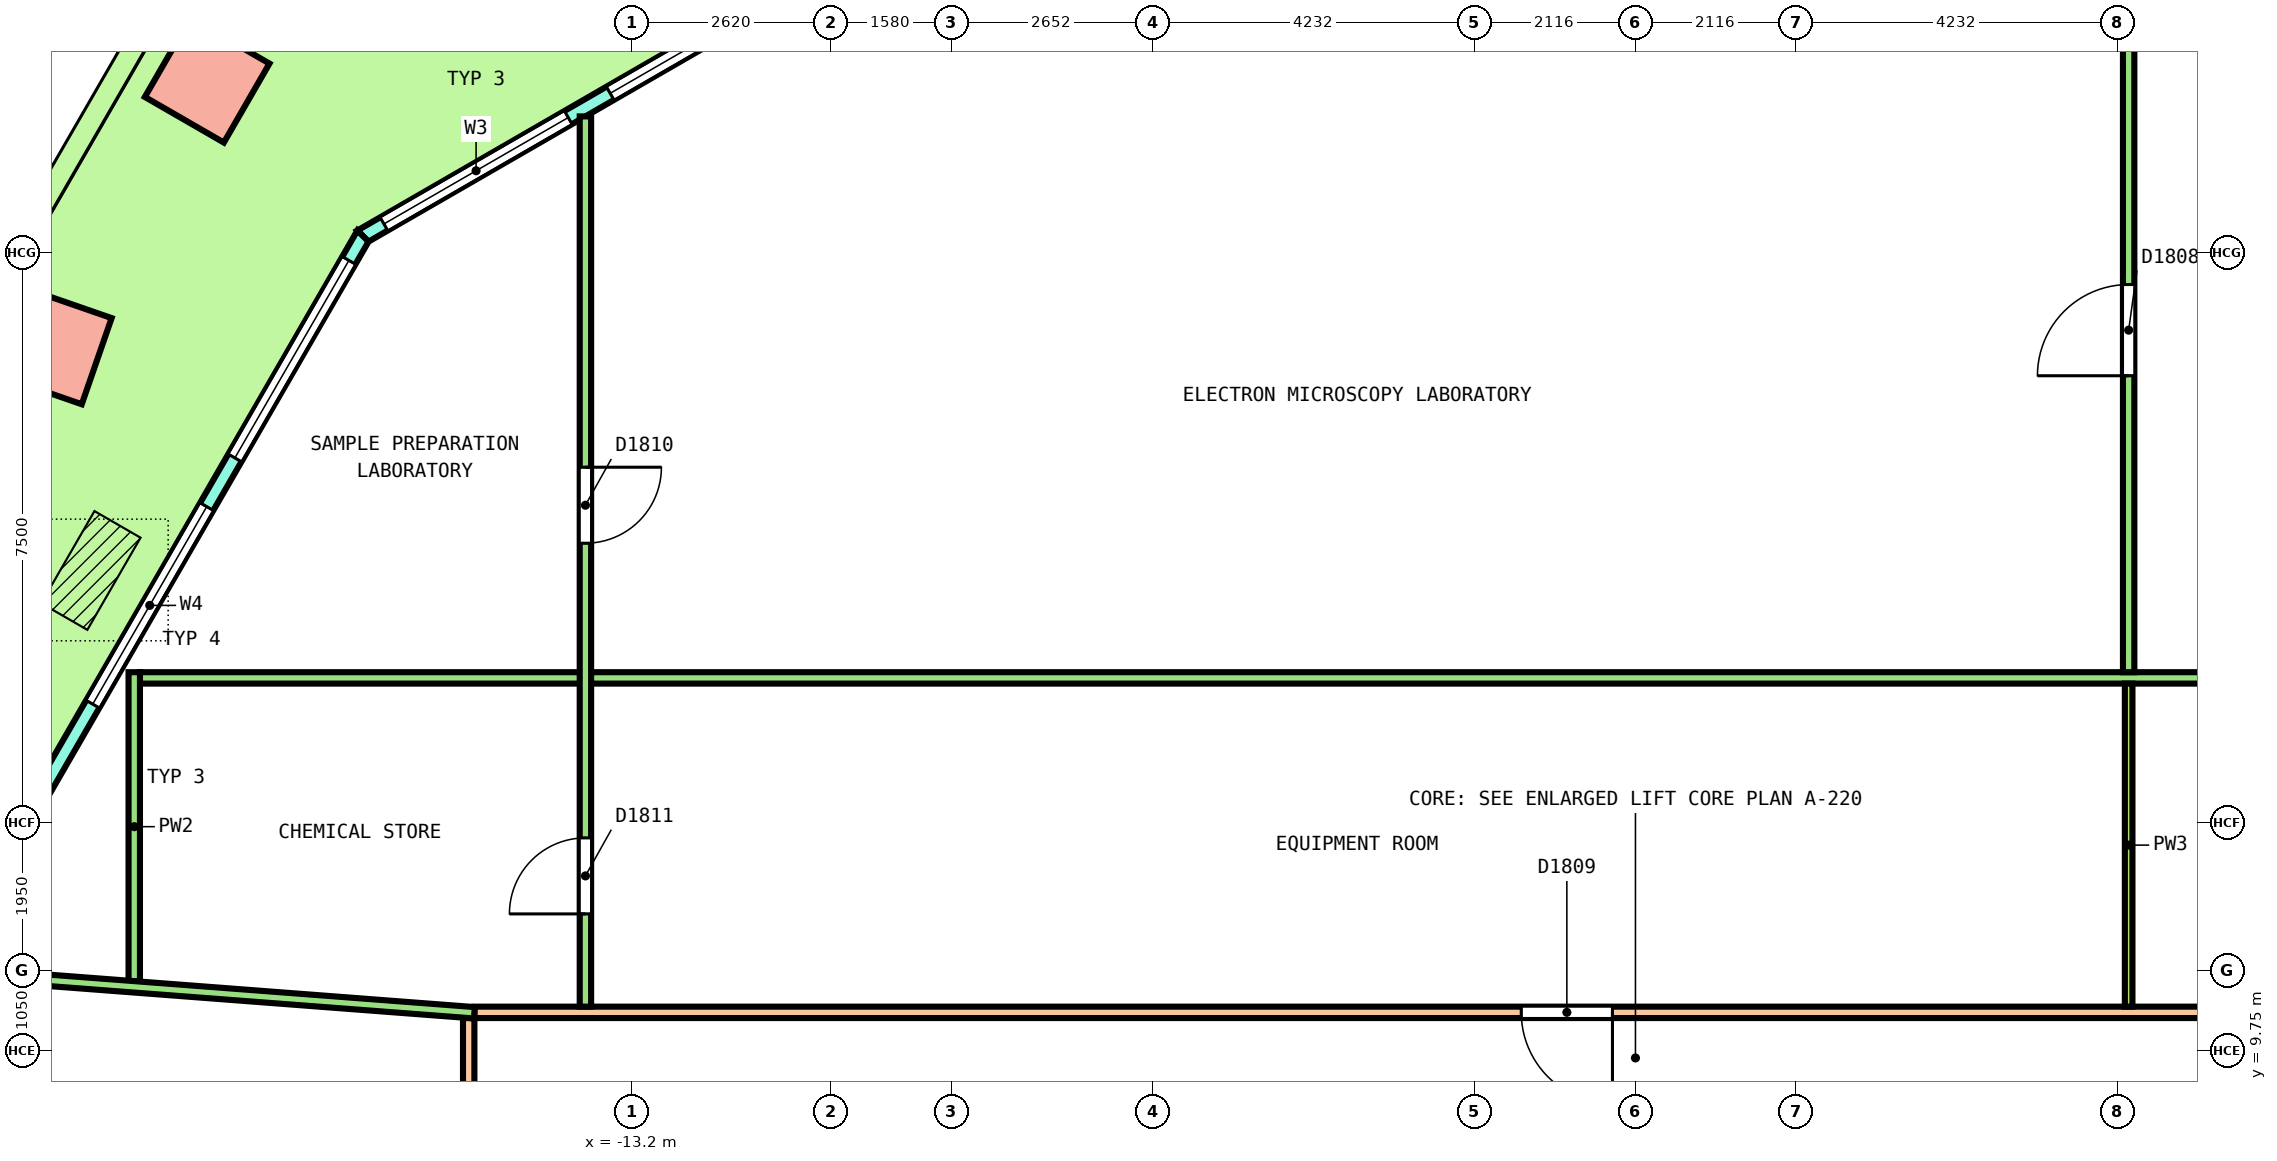
"""IFC4 building model, lengths in metres.
Left out: names, types, materials, properties, quantities, classifications, styles, units other than length and angle.
Written with IfcOpenShell. Run it as: python <this file> out.ifc"""

import sys

from ifc_helpers import new_model, si_unit, direction, frame, frame_2d, origin, origin_2d, place, context, subcontext, project, spatial, polyline, rectangle, outline, extrude, element, fill, save


model = new_model("IFC4")
c1 = context("Model", 3, precision=1e-05, world=origin(), true_north=direction((0.0, 1.0)))
c2 = subcontext(c1, "Body", "Model", "MODEL_VIEW")
j1 = project(units=[si_unit("LENGTHUNIT", "METRE"), si_unit("PLANEANGLEUNIT", "RADIAN")], contexts=[c1])
p1 = place(None, origin())
s1 = spatial("IfcSite", under=j1, at=p1, CompositionType="ELEMENT")
p2 = place(p1, origin())
s2 = spatial("IfcBuilding", under=s1, at=p2, CompositionType="ELEMENT")
p3 = place(p2, frame((0.0, 0.0, 171.6)))
s3 = spatial("IfcBuildingStorey", under=s2, at=p3, CompositionType="ELEMENT", Elevation=171.6)
p4 = place(p3, frame((-18.791, 22.512, 0.0), z_axis=(-0.036267419622, 0.0, 0.999342120734), x_axis=(-0.499424827821, -0.866167613071, -0.018124773713)))
e1 = element("IfcColumn", 1, at=p4, inside=s3, PredefinedType="COLUMN", context=c2, shape_type="SweptSolid", body=[
    extrude(rectangle(XDim=1.2, YDim=1.2, at=origin_2d()), origin(), (0.0, 0.0, 1.0), 4.052),
])
p5 = place(p3, frame((-20.811, 19.013, 0.0), z_axis=(-0.032656153574, 0.006266125409, 0.99944700275), x_axis=(-0.499519802521, -0.866234012369, -0.010890486839)))
e2 = element("IfcColumn", 2, at=p5, inside=s3, PredefinedType="COLUMN", context=c2, shape_type="SweptSolid", body=[
    extrude(rectangle(XDim=1.2, YDim=1.2, at=origin_2d()), origin(), (0.0, 0.0, 1.0), 4.052),
])
p6 = place(p3, frame((-10.788, 23.9, 0.0), z_axis=(0.0, 0.0, 1.0), x_axis=(-0.866029458321, -0.49999297727, 0.0)))
e3 = element("IfcWall", 3, at=p6, inside=s3, PredefinedType="SOLIDWALL", context=c2, shape_type="SweptSolid", body=[
    extrude(outline(polyline([(-0.027, -0.1), (1.128, -0.1), (2.282, -0.1), (3.437, -0.1), (4.592, -0.1), (5.747, -0.1), (6.901, -0.1), (6.848, 0.1), (5.711, 0.1), (4.574, 0.1), (3.437, 0.1), (2.301, 0.1), (1.164, 0.1), (0.027, 0.1), (-0.027, -0.1)])), origin(), (0.0, 0.0, 1.0), 4.1),
])
p7 = place(p6, frame((0.319, 0.0, 0.1)))
e4 = element("IfcOpeningElement", 4, at=p7, cuts=e3, PredefinedType="OPENING", context=c2, shape_type="SweptSolid", body=[
    extrude(rectangle(XDim=2.8, YDim=2.9, at=frame_2d((1.4, 1.45))), frame((0.0, 0.11, 0.0), z_axis=(0.0, -1.0, 0.0), x_axis=(1.0, 0.0, 0.0)), (0.0, 0.0, 1.0), 0.22),
])
p8 = place(p6, frame((3.756, 0.0, 0.1)))
e5 = element("IfcOpeningElement", 5, at=p8, cuts=e3, PredefinedType="OPENING", context=c2, shape_type="SweptSolid", body=[
    extrude(rectangle(XDim=2.8, YDim=2.9, at=frame_2d((1.4, 1.45))), frame((0.0, 0.11, 0.0), z_axis=(0.0, -1.0, 0.0), x_axis=(1.0, 0.0, 0.0)), (0.0, 0.0, 1.0), 0.22),
])
p9 = place(p3, frame((-16.741, 20.463, 0.0), z_axis=(0.0, 0.0, 1.0), x_axis=(-0.500003086107, -0.866023622012, 0.0)))
e6 = element("IfcWall", 6, at=p9, inside=s3, PredefinedType="SOLIDWALL", context=c2, shape_type="SweptSolid", body=[
    extrude(outline(polyline([(-0.027, -0.1), (1.015, -0.1), (2.057, -0.1), (3.099, -0.1), (4.141, -0.1), (5.183, -0.1), (6.225, -0.1), (7.267, -0.1), (8.309, -0.1), (9.351, -0.1), (10.393, -0.1), (11.435, -0.1), (12.476, -0.1), (13.518, -0.1), (14.56, -0.1), (15.602, -0.1), (16.644, -0.1), (17.686, -0.1), (18.728, -0.1), (18.674, 0.1), (17.638, 0.1), (16.602, 0.1), (15.566, 0.1), (14.531, 0.1), (13.494, 0.1), (12.458, 0.1), (11.423, 0.1), (10.386, 0.1), (9.351, 0.1), (8.315, 0.1), (7.279, 0.1), (6.243, 0.1), (5.207, 0.1), (4.171, 0.1), (3.135, 0.1), (2.099, 0.1), (1.063, 0.1), (0.027, 0.1), (-0.027, -0.1)])), origin(), (0.0, 0.0, 1.0), 4.1),
])
p10 = place(p9, frame((0.37, 0.0, 0.1)))
e7 = element("IfcOpeningElement", 7, at=p10, cuts=e6, PredefinedType="OPENING", context=c2, shape_type="SweptSolid", body=[
    extrude(rectangle(XDim=3.0, YDim=2.9, at=frame_2d((1.5, 1.45))), frame((0.0, 0.11, 0.0), z_axis=(0.0, -1.0, 0.0), x_axis=(1.0, 0.0, 0.0)), (0.0, 0.0, 1.0), 0.22),
])
p11 = place(p9, frame((4.11, 0.0, 0.1)))
e8 = element("IfcOpeningElement", 8, at=p11, cuts=e6, PredefinedType="OPENING", context=c2, shape_type="SweptSolid", body=[
    extrude(rectangle(XDim=3.0, YDim=2.9, at=frame_2d((1.5, 1.45))), frame((0.0, 0.11, 0.0), z_axis=(0.0, -1.0, 0.0), x_axis=(1.0, 0.0, 0.0)), (0.0, 0.0, 1.0), 0.22),
])
p12 = place(p9, frame((8.451, 0.0, 0.0)))
e9 = element("IfcOpeningElement", 9, at=p12, cuts=e6, PredefinedType="OPENING", context=c2, shape_type="SweptSolid", body=[
    extrude(rectangle(XDim=1.8, YDim=2.4, at=frame_2d((0.9, 1.2))), frame((0.0, 0.11, 0.0), z_axis=(0.0, -1.0, 0.0), x_axis=(1.0, 0.0, 0.0)), (0.0, 0.0, 1.0), 0.22),
])
p13 = place(p9, frame((8.451, 0.0, 2.55)))
e10 = element("IfcOpeningElement", 10, at=p13, cuts=e6, PredefinedType="OPENING", context=c2, shape_type="SweptSolid", body=[
    extrude(rectangle(XDim=1.8, YDim=0.45, at=frame_2d((0.9, 0.225))), frame((0.0, 0.11, 0.0), z_axis=(0.0, -1.0, 0.0), x_axis=(1.0, 0.0, 0.0)), (0.0, 0.0, 1.0), 0.22),
])
p14 = place(p9, frame((11.591, 0.0, 0.1)))
e11 = element("IfcOpeningElement", 11, at=p14, cuts=e6, PredefinedType="OPENING", context=c2, shape_type="SweptSolid", body=[
    extrude(rectangle(XDim=3.0, YDim=2.9, at=frame_2d((1.5, 1.45))), frame((0.0, 0.11, 0.0), z_axis=(0.0, -1.0, 0.0), x_axis=(1.0, 0.0, 0.0)), (0.0, 0.0, 1.0), 0.22),
])
p15 = place(p9, frame((15.331, 0.0, 0.1)))
e12 = element("IfcOpeningElement", 12, at=p15, cuts=e6, PredefinedType="OPENING", context=c2, shape_type="SweptSolid", body=[
    extrude(rectangle(XDim=3.0, YDim=2.9, at=frame_2d((1.5, 1.45))), frame((0.0, 0.11, 0.0), z_axis=(0.0, -1.0, 0.0), x_axis=(1.0, 0.0, 0.0)), (0.0, 0.0, 1.0), 0.22),
])
p16 = place(p3, frame((-15.275, 10.25, 0.0), z_axis=(0.0, 0.0, 1.0), x_axis=(1.0, 0.0, 0.0)))
e13 = element("IfcWall", 13, at=p16, inside=s3, PredefinedType="PARTITIONING", context=c2, shape_type="SweptSolid", body=[
    extrude(rectangle(XDim=30.55, YDim=0.15, at=frame_2d((15.275, 0.0))), origin(), (0.0, 0.0, 1.0), 3.05),
])
p17 = place(p16, frame((26.638, 0.0, 0.0)))
e14 = element("IfcOpeningElement", 14, at=p17, cuts=e13, PredefinedType="OPENING", context=c2, shape_type="SweptSolid", body=[
    extrude(rectangle(XDim=1.2, YDim=2.1, at=frame_2d((0.6, 1.05))), frame((0.0, 0.085, 0.0), z_axis=(0.0, -1.0, 0.0), x_axis=(1.0, 0.0, 0.0)), (0.0, 0.0, 1.0), 0.17),
])
p18 = place(p16, frame((13.773, 0.0, 0.0)))
e15 = element("IfcOpeningElement", 15, at=p18, cuts=e13, PredefinedType="OPENING", context=c2, shape_type="SweptSolid", body=[
    extrude(rectangle(XDim=1.2, YDim=2.1, at=frame_2d((0.6, 1.05))), frame((0.0, 0.085, 0.0), z_axis=(0.0, -1.0, 0.0), x_axis=(1.0, 0.0, 0.0)), (0.0, 0.0, 1.0), 0.17),
])
p19 = place(p3, frame((-15.35, 0.123, 0.0), z_axis=(0.0, 0.0, 1.0), x_axis=(0.0, 1.0, 0.0)))
e16 = element("IfcWall", 16, at=p19, inside=s3, PredefinedType="PARTITIONING", context=c2, shape_type="SweptSolid", body=[
    extrude(rectangle(XDim=10.052, YDim=0.15, at=frame_2d((5.026, 0.0))), origin(), (0.0, 0.0, 1.0), 3.05),
])
p20 = place(p3, frame((-19.675, 14.65, 0.0), z_axis=(0.0, 0.0, 1.0), x_axis=(1.0, 0.0, 0.0)))
e17 = element("IfcWall", 17, at=p20, inside=s3, PredefinedType="PARTITIONING", context=c2, shape_type="SweptSolid", body=[
    extrude(rectangle(XDim=39.5, YDim=0.15, at=frame_2d((19.75, 0.0))), origin(), (0.0, 0.0, 1.0), 3.05),
])
p21 = place(p20, frame((30.308, 0.0, 0.0)))
e18 = element("IfcOpeningElement", 18, at=p21, cuts=e17, PredefinedType="OPENING", context=c2, shape_type="SweptSolid", body=[
    extrude(rectangle(XDim=1.2, YDim=2.1, at=frame_2d((0.6, 1.05))), frame((0.0, 0.085, 0.0), z_axis=(0.0, -1.0, 0.0), x_axis=(1.0, 0.0, 0.0)), (0.0, 0.0, 1.0), 0.17),
])
p22 = place(p3, frame((6.489, 14.725, 0.0), z_axis=(0.0, 0.0, 1.0), x_axis=(0.0, 1.0, 0.0)))
e19 = element("IfcWall", 19, at=p22, inside=s3, PredefinedType="PARTITIONING", context=c2, shape_type="SweptSolid", body=[
    extrude(rectangle(XDim=9.075, YDim=0.15, at=frame_2d((4.538, 0.0))), origin(), (0.0, 0.0, 1.0), 3.05),
])
p23 = place(p22, frame((3.9, 0.0, 0.0)))
e20 = element("IfcOpeningElement", 20, at=p23, cuts=e19, PredefinedType="OPENING", context=c2, shape_type="SweptSolid", body=[
    extrude(rectangle(XDim=1.2, YDim=2.1, at=frame_2d((0.6, 1.05))), frame((0.0, 0.085, 0.0), z_axis=(0.0, -1.0, 0.0), x_axis=(1.0, 0.0, 0.0)), (0.0, 0.0, 1.0), 0.17),
])
p24 = place(p3, frame((-13.814, 10.325, 0.0), z_axis=(0.0, 0.0, 1.0), x_axis=(0.0, 1.0, 0.0)))
e21 = element("IfcWall", 21, at=p24, inside=s3, PredefinedType="PARTITIONING", context=c2, shape_type="SweptSolid", body=[
    extrude(rectangle(XDim=11.712, YDim=0.15, at=frame_2d((5.856, 0.0))), origin(), (0.0, 0.0, 1.0), 3.05),
])
p25 = place(p24, frame((6.097, 0.0, 0.0)))
e22 = element("IfcOpeningElement", 22, at=p25, cuts=e21, PredefinedType="OPENING", context=c2, shape_type="SweptSolid", body=[
    extrude(rectangle(XDim=1.0, YDim=2.1, at=frame_2d((0.5, 1.05))), frame((0.0, 0.085, 0.0), z_axis=(0.0, -1.0, 0.0), x_axis=(1.0, 0.0, 0.0)), (0.0, 0.0, 1.0), 0.17),
])
p26 = place(p24, frame((1.22, 0.0, 0.0)))
e23 = element("IfcOpeningElement", 23, at=p26, cuts=e21, PredefinedType="OPENING", context=c2, shape_type="SweptSolid", body=[
    extrude(rectangle(XDim=1.0, YDim=2.1, at=frame_2d((0.5, 1.05))), frame((0.0, 0.085, 0.0), z_axis=(0.0, -1.0, 0.0), x_axis=(1.0, 0.0, 0.0)), (0.0, 0.0, 1.0), 0.17),
])
p27 = place(p3, frame((-19.75, 10.66, 0.0), z_axis=(0.0, 0.0, 1.0), x_axis=(0.0, 1.0, 0.0)))
e24 = element("IfcWall", 24, at=p27, inside=s3, PredefinedType="PARTITIONING", context=c2, shape_type="SweptSolid", body=[
    extrude(rectangle(XDim=4.065, YDim=0.15, at=frame_2d((2.032, 0.0))), origin(), (0.0, 0.0, 1.0), 3.05),
])
p28 = place(p3, frame((-22.219, 10.774, 0.0), z_axis=(0.0, 0.0, 1.0), x_axis=(0.997107855609, -0.075999501862, 0.0)))
e25 = element("IfcWall", 25, at=p28, inside=s3, PredefinedType="PARTITIONING", context=c2, shape_type="SweptSolid", body=[
    extrude(rectangle(XDim=6.965, YDim=0.15, at=frame_2d((3.482, 0.0))), origin(), (0.0, 0.0, 1.0), 3.05),
])
p29 = place(p3, frame((6.489, 10.325, 0.0), z_axis=(0.0, 0.0, 1.0), x_axis=(0.0, 1.0, 0.0)))
e26 = element("IfcWall", 26, at=p29, inside=s3, PredefinedType="PARTITIONING", context=c2, shape_type="SweptSolid", body=[
    extrude(rectangle(XDim=4.25, YDim=0.1, at=frame_2d((2.125, 0.0))), origin(), (0.0, 0.0, 1.0), 3.05),
])
p30 = place(p7, origin())
e27 = element("IfcWindow", 27, at=p30, inside=s3, PartitioningType="SINGLE_PANEL", PredefinedType="WINDOW", context=c2, shape_type="SweptSolid", body=[
    extrude(rectangle(XDim=2.8, YDim=2.9, at=frame_2d((1.4, 1.45))), frame((0.0, 0.03, 0.0), z_axis=(0.0, -1.0, 0.0), x_axis=(1.0, 0.0, 0.0)), (0.0, 0.0, 1.0), 0.06),
])
fill(e4, e27)
p31 = place(p8, origin())
e28 = element("IfcWindow", 28, at=p31, inside=s3, PartitioningType="SINGLE_PANEL", PredefinedType="WINDOW", context=c2, shape_type="SweptSolid", body=[
    extrude(rectangle(XDim=2.8, YDim=2.9, at=frame_2d((1.4, 1.45))), frame((0.0, 0.03, 0.0), z_axis=(0.0, -1.0, 0.0), x_axis=(1.0, 0.0, 0.0)), (0.0, 0.0, 1.0), 0.06),
])
fill(e5, e28)
p32 = place(p10, origin())
e29 = element("IfcWindow", 29, at=p32, inside=s3, PartitioningType="SINGLE_PANEL", PredefinedType="WINDOW", context=c2, shape_type="SweptSolid", body=[
    extrude(rectangle(XDim=3.0, YDim=2.9, at=frame_2d((1.5, 1.45))), frame((0.0, 0.03, 0.0), z_axis=(0.0, -1.0, 0.0), x_axis=(1.0, 0.0, 0.0)), (0.0, 0.0, 1.0), 0.06),
])
fill(e7, e29)
p33 = place(p11, origin())
e30 = element("IfcWindow", 30, at=p33, inside=s3, PartitioningType="SINGLE_PANEL", PredefinedType="WINDOW", context=c2, shape_type="SweptSolid", body=[
    extrude(rectangle(XDim=3.0, YDim=2.9, at=frame_2d((1.5, 1.45))), frame((0.0, 0.03, 0.0), z_axis=(0.0, -1.0, 0.0), x_axis=(1.0, 0.0, 0.0)), (0.0, 0.0, 1.0), 0.06),
])
fill(e8, e30)
p34 = place(p23, origin())
e31 = element("IfcDoor", 31, at=p34, inside=s3, OperationType="DOUBLE_DOOR_SINGLE_SWING", PredefinedType="DOOR", context=c2, shape_type="SweptSolid", body=[
    extrude(rectangle(XDim=1.2, YDim=2.1, at=frame_2d((0.6, 1.05))), frame((0.0, 0.025, 0.0), z_axis=(0.0, -1.0, 0.0), x_axis=(1.0, 0.0, 0.0)), (0.0, 0.0, 1.0), 0.05),
])
fill(e20, e31)
p35 = place(p18, origin())
e32 = element("IfcDoor", 32, at=p35, inside=s3, OperationType="DOUBLE_DOOR_SINGLE_SWING", PredefinedType="DOOR", context=c2, shape_type="SweptSolid", body=[
    extrude(rectangle(XDim=1.2, YDim=2.1, at=frame_2d((0.6, 1.05))), frame((0.0, 0.025, 0.0), z_axis=(0.0, -1.0, 0.0), x_axis=(1.0, 0.0, 0.0)), (0.0, 0.0, 1.0), 0.05),
])
fill(e15, e32)
p36 = place(p25, origin())
e33 = element("IfcDoor", 33, at=p36, inside=s3, OperationType="SINGLE_SWING_RIGHT", PredefinedType="DOOR", context=c2, shape_type="SweptSolid", body=[
    extrude(rectangle(XDim=1.0, YDim=2.1, at=frame_2d((0.5, 1.05))), frame((0.0, 0.025, 0.0), z_axis=(0.0, -1.0, 0.0), x_axis=(1.0, 0.0, 0.0)), (0.0, 0.0, 1.0), 0.05),
])
fill(e22, e33)
p37 = place(p26, origin())
e34 = element("IfcDoor", 34, at=p37, inside=s3, OperationType="SINGLE_SWING_RIGHT", PredefinedType="DOOR", context=c2, shape_type="SweptSolid", body=[
    extrude(rectangle(XDim=1.0, YDim=2.1, at=frame_2d((0.5, 1.05))), frame((0.0, 0.025, 0.0), z_axis=(0.0, -1.0, 0.0), x_axis=(1.0, 0.0, 0.0)), (0.0, 0.0, 1.0), 0.05),
])
fill(e23, e34)
save(model, sys.argv[1])
